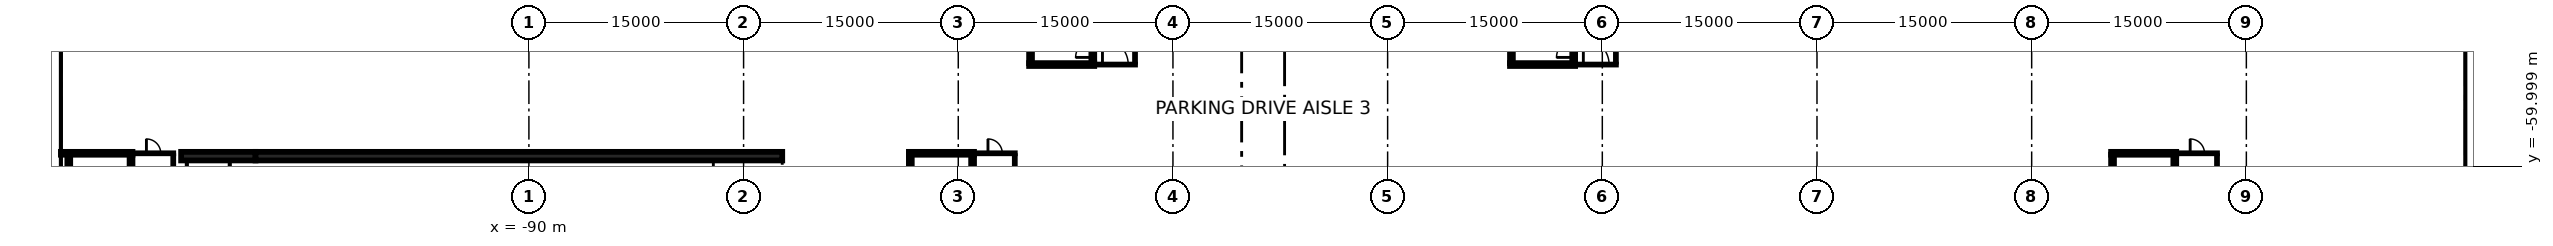
"""IFC4 building model, lengths in metres.
Left out: names, types, materials, properties, quantities, classifications, styles, units other than length and angle.
Written with IfcOpenShell. Run it as: python <this file> out.ifc"""

import sys

from ifc_helpers import new_model, si_unit, direction, frame, frame_2d, origin, place, context, subcontext, project, spatial, rectangle, extrude, element, fill, save


model = new_model("IFC4")
c1 = context("Model", 3, precision=1e-05, world=origin(), true_north=direction((0.0, 1.0)))
c2 = subcontext(c1, "Body", "Model", "MODEL_VIEW")
j1 = project(units=[si_unit("LENGTHUNIT", "METRE"), si_unit("PLANEANGLEUNIT", "RADIAN")], contexts=[c1])
p1 = place(None, origin())
s1 = spatial("IfcSite", under=j1, at=p1, CompositionType="ELEMENT")
p2 = place(p1, origin())
s2 = spatial("IfcBuilding", under=s1, at=p2, CompositionType="ELEMENT")
p3 = place(p2, frame((0.0, 0.0, -12.0)))
s3 = spatial("IfcBuildingStorey", under=s2, at=p3, CompositionType="ELEMENT", Elevation=-12.0)
for number, where, z_axis, x_axis in (
    (1, (-123.15, -80.0, 0.0), (0.0, 0.0, 1.0), (0.0, 1.0, 0.0)),
    (2, (45.75, -80.0, 0.0), (0.0, 0.0, 1.0), (0.0, 1.0, 0.0)),
):
    element("IfcWall", number, at=place(p3, frame(where, z_axis=z_axis, x_axis=x_axis)), inside=s3, PredefinedType="USERDEFINED", context=c2, shape_type="SweptSolid", body=[
        extrude(rectangle(XDim=160.0, YDim=0.9, at=frame_2d((80.0, 0.0))), origin(), (0.0, 0.0, 1.0), 11.55),
    ])
p4 = place(p2, frame((0.0, 0.0, -3.6)))
s4 = spatial("IfcBuildingStorey", under=s2, at=p4, CompositionType="ELEMENT", Elevation=-3.6)
p5 = place(p4, frame((-58.9, -59.1, 0.0), z_axis=(0.0, 0.0, 1.0), x_axis=(1.0, 0.0, 0.0)))
e3 = element("IfcWall", 3, at=p5, inside=s4, PredefinedType="PARTITIONING", context=c2, shape_type="SweptSolid", body=[
    extrude(rectangle(XDim=2.95, YDim=0.2, at=frame_2d((1.475, 0.0))), origin(), (0.0, 0.0, 1.0), 3.15),
])
p6 = place(p5, frame((0.975, 0.0, 0.0)))
e4 = element("IfcOpeningElement", 4, at=p6, cuts=e3, PredefinedType="OPENING", context=c2, shape_type="SweptSolid", body=[
    extrude(rectangle(XDim=1.0, YDim=2.1, at=frame_2d((0.5, 1.05))), frame((0.0, 0.11, 0.0), z_axis=(0.0, -1.0, 0.0), x_axis=(1.0, 0.0, 0.0)), (0.0, 0.0, 1.0), 0.22),
])
p7 = place(p4, frame((-56.05, -64.8, 0.0), z_axis=(0.0, 0.0, 1.0), x_axis=(0.0, 1.0, 0.0)))
e5 = element("IfcWall", 5, at=p7, inside=s4, PredefinedType="PARTITIONING", context=c2, shape_type="SweptSolid", body=[
    extrude(rectangle(XDim=5.6, YDim=0.2, at=frame_2d((2.8, 0.0))), origin(), (0.0, 0.0, 1.0), 3.15),
])
p8 = place(p4, frame((-50.5, -52.9, 0.0), z_axis=(0.0, 0.0, 1.0), x_axis=(1.0, 0.0, 0.0)))
e6 = element("IfcWall", 6, at=p8, inside=s4, PredefinedType="PARTITIONING", context=c2, shape_type="SweptSolid", body=[
    extrude(rectangle(XDim=2.95, YDim=0.2, at=frame_2d((1.475, 0.0))), origin(), (0.0, 0.0, 1.0), 3.15),
])
p9 = place(p8, frame((0.575, 0.0, 0.0)))
e7 = element("IfcOpeningElement", 7, at=p9, cuts=e6, PredefinedType="OPENING", context=c2, shape_type="SweptSolid", body=[
    extrude(rectangle(XDim=1.8, YDim=2.1, at=frame_2d((0.9, 1.05))), frame((0.0, 0.11, 0.0), z_axis=(0.0, -1.0, 0.0), x_axis=(1.0, 0.0, 0.0)), (0.0, 0.0, 1.0), 0.22),
])
p10 = place(p4, frame((-47.65, -52.8, 0.0), z_axis=(0.0, 0.0, 1.0), x_axis=(0.0, 1.0, 0.0)))
e8 = element("IfcWall", 8, at=p10, inside=s4, PredefinedType="PARTITIONING", context=c2, shape_type="SweptSolid", body=[
    extrude(rectangle(XDim=3.6, YDim=0.2, at=frame_2d((1.8, 0.0))), origin(), (0.0, 0.0, 1.0), 3.15),
])
p11 = place(p4, frame((-16.9, -52.9, 0.0), z_axis=(0.0, 0.0, 1.0), x_axis=(1.0, 0.0, 0.0)))
e9 = element("IfcWall", 9, at=p11, inside=s4, PredefinedType="PARTITIONING", context=c2, shape_type="SweptSolid", body=[
    extrude(rectangle(XDim=2.95, YDim=0.2, at=frame_2d((1.475, 0.0))), origin(), (0.0, 0.0, 1.0), 3.15),
])
p12 = place(p11, frame((0.575, 0.0, 0.0)))
e10 = element("IfcOpeningElement", 10, at=p12, cuts=e9, PredefinedType="OPENING", context=c2, shape_type="SweptSolid", body=[
    extrude(rectangle(XDim=1.8, YDim=2.1, at=frame_2d((0.9, 1.05))), frame((0.0, 0.11, 0.0), z_axis=(0.0, -1.0, 0.0), x_axis=(1.0, 0.0, 0.0)), (0.0, 0.0, 1.0), 0.22),
])
p13 = place(p4, frame((-14.05, -52.8, 0.0), z_axis=(0.0, 0.0, 1.0), x_axis=(0.0, 1.0, 0.0)))
e11 = element("IfcWall", 11, at=p13, inside=s4, PredefinedType="PARTITIONING", context=c2, shape_type="SweptSolid", body=[
    extrude(rectangle(XDim=3.6, YDim=0.2, at=frame_2d((1.8, 0.0))), origin(), (0.0, 0.0, 1.0), 3.15),
])
p14 = place(p4, frame((25.1, -59.1, 0.0), z_axis=(0.0, 0.0, 1.0), x_axis=(1.0, 0.0, 0.0)))
e12 = element("IfcWall", 12, at=p14, inside=s4, PredefinedType="PARTITIONING", context=c2, shape_type="SweptSolid", body=[
    extrude(rectangle(XDim=2.95, YDim=0.2, at=frame_2d((1.475, 0.0))), origin(), (0.0, 0.0, 1.0), 3.15),
])
p15 = place(p14, frame((0.975, 0.0, 0.0)))
e13 = element("IfcOpeningElement", 13, at=p15, cuts=e12, PredefinedType="OPENING", context=c2, shape_type="SweptSolid", body=[
    extrude(rectangle(XDim=1.0, YDim=2.1, at=frame_2d((0.5, 1.05))), frame((0.0, 0.11, 0.0), z_axis=(0.0, -1.0, 0.0), x_axis=(1.0, 0.0, 0.0)), (0.0, 0.0, 1.0), 0.22),
])
p16 = place(p4, frame((27.95, -64.8, 0.0), z_axis=(0.0, 0.0, 1.0), x_axis=(0.0, 1.0, 0.0)))
e14 = element("IfcWall", 14, at=p16, inside=s4, PredefinedType="PARTITIONING", context=c2, shape_type="SweptSolid", body=[
    extrude(rectangle(XDim=5.6, YDim=0.2, at=frame_2d((2.8, 0.0))), origin(), (0.0, 0.0, 1.0), 3.15),
])
p17 = place(p4, frame((-117.7, -59.1, 0.0), z_axis=(0.0, 0.0, 1.0), x_axis=(1.0, 0.0, 0.0)))
e15 = element("IfcWall", 15, at=p17, inside=s4, PredefinedType="PARTITIONING", context=c2, shape_type="SweptSolid", body=[
    extrude(rectangle(XDim=2.95, YDim=0.2, at=frame_2d((1.475, 0.0))), origin(), (0.0, 0.0, 1.0), 3.15),
])
p18 = place(p17, frame((0.975, 0.0, 0.0)))
e16 = element("IfcOpeningElement", 16, at=p18, cuts=e15, PredefinedType="OPENING", context=c2, shape_type="SweptSolid", body=[
    extrude(rectangle(XDim=1.0, YDim=2.1, at=frame_2d((0.5, 1.05))), frame((0.0, 0.11, 0.0), z_axis=(0.0, -1.0, 0.0), x_axis=(1.0, 0.0, 0.0)), (0.0, 0.0, 1.0), 0.22),
])
p19 = place(p4, frame((-114.85, -64.8, 0.0), z_axis=(0.0, 0.0, 1.0), x_axis=(0.0, 1.0, 0.0)))
e17 = element("IfcWall", 17, at=p19, inside=s4, PredefinedType="PARTITIONING", context=c2, shape_type="SweptSolid", body=[
    extrude(rectangle(XDim=5.6, YDim=0.2, at=frame_2d((2.8, 0.0))), origin(), (0.0, 0.0, 1.0), 3.15),
])
p20 = place(p4, frame((-63.35, -68.8, 0.0), z_axis=(0.0, 0.0, 1.0), x_axis=(0.0, 1.0, 0.0)))
e18 = element("IfcWall", 18, at=p20, inside=s4, PredefinedType="SOLIDWALL", context=c2, shape_type="SweptSolid", body=[
    extrude(rectangle(XDim=9.6, YDim=0.2, at=frame_2d((4.8, 0.0))), origin(), (0.0, 0.0, 1.0), 3.15),
])
p21 = place(p4, frame((-59.0, -68.8, 0.0), z_axis=(0.0, 0.0, 1.0), x_axis=(0.0, 1.0, 0.0)))
e19 = element("IfcWall", 19, at=p21, inside=s4, PredefinedType="SOLIDWALL", context=c2, shape_type="SweptSolid", body=[
    extrude(rectangle(XDim=9.6, YDim=0.2, at=frame_2d((4.8, 0.0))), origin(), (0.0, 0.0, 1.0), 3.15),
])
p22 = place(p21, frame((0.4, 0.0, 0.0)))
e20 = element("IfcOpeningElement", 20, at=p22, cuts=e19, PredefinedType="OPENING", context=c2, shape_type="SweptSolid", body=[
    extrude(rectangle(XDim=1.2, YDim=2.1, at=frame_2d((0.6, 1.05))), frame((0.0, 0.11, 0.0), z_axis=(0.0, -1.0, 0.0), x_axis=(1.0, 0.0, 0.0)), (0.0, 0.0, 1.0), 0.22),
])
p23 = place(p4, frame((-63.45, -59.1, 0.0), z_axis=(0.0, 0.0, 1.0), x_axis=(1.0, 0.0, 0.0)))
e21 = element("IfcWall", 21, at=p23, inside=s4, PredefinedType="SOLIDWALL", context=c2, shape_type="SweptSolid", body=[
    extrude(rectangle(XDim=4.55, YDim=0.2, at=frame_2d((2.275, 0.0))), origin(), (0.0, 0.0, 1.0), 3.15),
])
p24 = place(p4, frame((-54.95, -52.8, 0.0), z_axis=(0.0, 0.0, 1.0), x_axis=(0.0, 1.0, 0.0)))
e22 = element("IfcWall", 22, at=p24, inside=s4, PredefinedType="SOLIDWALL", context=c2, shape_type="SweptSolid", body=[
    extrude(rectangle(XDim=9.6, YDim=0.2, at=frame_2d((4.8, 0.0))), origin(), (0.0, 0.0, 1.0), 3.15),
])
p25 = place(p4, frame((-50.6, -52.8, 0.0), z_axis=(0.0, 0.0, 1.0), x_axis=(0.0, 1.0, 0.0)))
e23 = element("IfcWall", 23, at=p25, inside=s4, PredefinedType="SOLIDWALL", context=c2, shape_type="SweptSolid", body=[
    extrude(rectangle(XDim=9.6, YDim=0.2, at=frame_2d((4.8, 0.0))), origin(), (0.0, 0.0, 1.0), 3.15),
])
p26 = place(p25, frame((0.4, 0.0, 0.0)))
e24 = element("IfcOpeningElement", 24, at=p26, cuts=e23, PredefinedType="OPENING", context=c2, shape_type="SweptSolid", body=[
    extrude(rectangle(XDim=1.2, YDim=2.1, at=frame_2d((0.6, 1.05))), frame((0.0, 0.11, 0.0), z_axis=(0.0, -1.0, 0.0), x_axis=(1.0, 0.0, 0.0)), (0.0, 0.0, 1.0), 0.22),
])
p27 = place(p4, frame((-50.5, -52.9, 0.0), z_axis=(0.0, 0.0, 1.0), x_axis=(-1.0, 0.0, 0.0)))
e25 = element("IfcWall", 25, at=p27, inside=s4, PredefinedType="SOLIDWALL", context=c2, shape_type="SweptSolid", body=[
    extrude(rectangle(XDim=4.55, YDim=0.2, at=frame_2d((2.275, 0.0))), origin(), (0.0, 0.0, 1.0), 3.15),
])
p28 = place(p4, frame((-21.35, -52.8, 0.0), z_axis=(0.0, 0.0, 1.0), x_axis=(0.0, 1.0, 0.0)))
e26 = element("IfcWall", 26, at=p28, inside=s4, PredefinedType="SOLIDWALL", context=c2, shape_type="SweptSolid", body=[
    extrude(rectangle(XDim=9.6, YDim=0.2, at=frame_2d((4.8, 0.0))), origin(), (0.0, 0.0, 1.0), 3.15),
])
p29 = place(p4, frame((-17.0, -52.8, 0.0), z_axis=(0.0, 0.0, 1.0), x_axis=(0.0, 1.0, 0.0)))
e27 = element("IfcWall", 27, at=p29, inside=s4, PredefinedType="SOLIDWALL", context=c2, shape_type="SweptSolid", body=[
    extrude(rectangle(XDim=9.6, YDim=0.2, at=frame_2d((4.8, 0.0))), origin(), (0.0, 0.0, 1.0), 3.15),
])
p30 = place(p29, frame((0.4, 0.0, 0.0)))
e28 = element("IfcOpeningElement", 28, at=p30, cuts=e27, PredefinedType="OPENING", context=c2, shape_type="SweptSolid", body=[
    extrude(rectangle(XDim=1.2, YDim=2.1, at=frame_2d((0.6, 1.05))), frame((0.0, 0.11, 0.0), z_axis=(0.0, -1.0, 0.0), x_axis=(1.0, 0.0, 0.0)), (0.0, 0.0, 1.0), 0.22),
])
p31 = place(p4, frame((-16.9, -52.9, 0.0), z_axis=(0.0, 0.0, 1.0), x_axis=(-1.0, 0.0, 0.0)))
e29 = element("IfcWall", 29, at=p31, inside=s4, PredefinedType="SOLIDWALL", context=c2, shape_type="SweptSolid", body=[
    extrude(rectangle(XDim=4.55, YDim=0.2, at=frame_2d((2.275, 0.0))), origin(), (0.0, 0.0, 1.0), 3.15),
])
p32 = place(p4, frame((20.65, -68.8, 0.0), z_axis=(0.0, 0.0, 1.0), x_axis=(0.0, 1.0, 0.0)))
e30 = element("IfcWall", 30, at=p32, inside=s4, PredefinedType="SOLIDWALL", context=c2, shape_type="SweptSolid", body=[
    extrude(rectangle(XDim=9.6, YDim=0.2, at=frame_2d((4.8, 0.0))), origin(), (0.0, 0.0, 1.0), 3.15),
])
p33 = place(p4, frame((25.0, -68.8, 0.0), z_axis=(0.0, 0.0, 1.0), x_axis=(0.0, 1.0, 0.0)))
e31 = element("IfcWall", 31, at=p33, inside=s4, PredefinedType="SOLIDWALL", context=c2, shape_type="SweptSolid", body=[
    extrude(rectangle(XDim=9.6, YDim=0.2, at=frame_2d((4.8, 0.0))), origin(), (0.0, 0.0, 1.0), 3.15),
])
p34 = place(p33, frame((0.4, 0.0, 0.0)))
e32 = element("IfcOpeningElement", 32, at=p34, cuts=e31, PredefinedType="OPENING", context=c2, shape_type="SweptSolid", body=[
    extrude(rectangle(XDim=1.2, YDim=2.1, at=frame_2d((0.6, 1.05))), frame((0.0, 0.11, 0.0), z_axis=(0.0, -1.0, 0.0), x_axis=(1.0, 0.0, 0.0)), (0.0, 0.0, 1.0), 0.22),
])
p35 = place(p4, frame((20.55, -59.1, 0.0), z_axis=(0.0, 0.0, 1.0), x_axis=(1.0, 0.0, 0.0)))
e33 = element("IfcWall", 33, at=p35, inside=s4, PredefinedType="SOLIDWALL", context=c2, shape_type="SweptSolid", body=[
    extrude(rectangle(XDim=4.55, YDim=0.2, at=frame_2d((2.275, 0.0))), origin(), (0.0, 0.0, 1.0), 3.15),
])
p36 = place(p4, frame((-122.15, -68.8, 0.0), z_axis=(0.0, 0.0, 1.0), x_axis=(0.0, 1.0, 0.0)))
e34 = element("IfcWall", 34, at=p36, inside=s4, PredefinedType="SOLIDWALL", context=c2, shape_type="SweptSolid", body=[
    extrude(rectangle(XDim=9.6, YDim=0.2, at=frame_2d((4.8, 0.0))), origin(), (0.0, 0.0, 1.0), 3.15),
])
p37 = place(p4, frame((-117.8, -68.8, 0.0), z_axis=(0.0, 0.0, 1.0), x_axis=(0.0, 1.0, 0.0)))
e35 = element("IfcWall", 35, at=p37, inside=s4, PredefinedType="SOLIDWALL", context=c2, shape_type="SweptSolid", body=[
    extrude(rectangle(XDim=9.6, YDim=0.2, at=frame_2d((4.8, 0.0))), origin(), (0.0, 0.0, 1.0), 3.15),
])
p38 = place(p37, frame((0.4, 0.0, 0.0)))
e36 = element("IfcOpeningElement", 36, at=p38, cuts=e35, PredefinedType="OPENING", context=c2, shape_type="SweptSolid", body=[
    extrude(rectangle(XDim=1.2, YDim=2.1, at=frame_2d((0.6, 1.05))), frame((0.0, 0.11, 0.0), z_axis=(0.0, -1.0, 0.0), x_axis=(1.0, 0.0, 0.0)), (0.0, 0.0, 1.0), 0.22),
])
p39 = place(p4, frame((-122.7, -59.1, 0.0), z_axis=(0.0, 0.0, 1.0), x_axis=(1.0, 0.0, 0.0)))
e37 = element("IfcWall", 37, at=p39, inside=s4, PredefinedType="SOLIDWALL", context=c2, shape_type="SweptSolid", body=[
    extrude(rectangle(XDim=5.0, YDim=0.2, at=frame_2d((2.5, 0.0))), origin(), (0.0, 0.0, 1.0), 3.15),
])
p40 = place(p4, frame((-114.3, -59.3, 0.0), z_axis=(0.0, 0.0, 1.0), x_axis=(1.0, 0.0, 0.0)))
e38 = element("IfcWall", 38, at=p40, inside=s4, PredefinedType="SOLIDWALL", context=c2, shape_type="SweptSolid", body=[
    extrude(rectangle(XDim=5.2, YDim=0.6, at=frame_2d((2.6, 0.0))), origin(), (0.0, 0.0, 1.0), 3.15),
])
p41 = place(p4, frame((-109.1, -59.3, 0.0), z_axis=(0.0, 0.0, 1.0), x_axis=(1.0, 0.0, 0.0)))
e39 = element("IfcWall", 39, at=p41, inside=s4, PredefinedType="SOLIDWALL", context=c2, shape_type="SweptSolid", body=[
    extrude(rectangle(XDim=36.8, YDim=0.6, at=frame_2d((18.4, 0.0))), origin(), (0.0, 0.0, 1.0), 3.15),
])
p42 = place(p6, origin())
e40 = element("IfcDoor", 40, at=p42, inside=s4, OperationType="SINGLE_SWING_LEFT", PredefinedType="DOOR", context=c2, shape_type="SweptSolid", body=[
    extrude(rectangle(XDim=1.0, YDim=2.1, at=frame_2d((0.5, 1.05))), frame((0.0, 0.025, 0.0), z_axis=(0.0, -1.0, 0.0), x_axis=(1.0, 0.0, 0.0)), (0.0, 0.0, 1.0), 0.05),
])
fill(e4, e40)
p43 = place(p9, origin())
e41 = element("IfcDoor", 41, at=p43, inside=s4, OperationType="DOUBLE_DOOR_SINGLE_SWING", PredefinedType="DOOR", context=c2, shape_type="SweptSolid", body=[
    extrude(rectangle(XDim=1.8, YDim=2.1, at=frame_2d((0.9, 1.05))), frame((0.0, 0.025, 0.0), z_axis=(0.0, -1.0, 0.0), x_axis=(1.0, 0.0, 0.0)), (0.0, 0.0, 1.0), 0.05),
])
fill(e7, e41)
p44 = place(p12, origin())
e42 = element("IfcDoor", 42, at=p44, inside=s4, OperationType="DOUBLE_DOOR_SINGLE_SWING", PredefinedType="DOOR", context=c2, shape_type="SweptSolid", body=[
    extrude(rectangle(XDim=1.8, YDim=2.1, at=frame_2d((0.9, 1.05))), frame((0.0, 0.025, 0.0), z_axis=(0.0, -1.0, 0.0), x_axis=(1.0, 0.0, 0.0)), (0.0, 0.0, 1.0), 0.05),
])
fill(e10, e42)
p45 = place(p15, origin())
e43 = element("IfcDoor", 43, at=p45, inside=s4, OperationType="SINGLE_SWING_LEFT", PredefinedType="DOOR", context=c2, shape_type="SweptSolid", body=[
    extrude(rectangle(XDim=1.0, YDim=2.1, at=frame_2d((0.5, 1.05))), frame((0.0, 0.025, 0.0), z_axis=(0.0, -1.0, 0.0), x_axis=(1.0, 0.0, 0.0)), (0.0, 0.0, 1.0), 0.05),
])
fill(e13, e43)
p46 = place(p18, origin())
e44 = element("IfcDoor", 44, at=p46, inside=s4, OperationType="SINGLE_SWING_LEFT", PredefinedType="DOOR", context=c2, shape_type="SweptSolid", body=[
    extrude(rectangle(XDim=1.0, YDim=2.1, at=frame_2d((0.5, 1.05))), frame((0.0, 0.025, 0.0), z_axis=(0.0, -1.0, 0.0), x_axis=(1.0, 0.0, 0.0)), (0.0, 0.0, 1.0), 0.05),
])
fill(e16, e44)
p47 = place(p26, origin())
e45 = element("IfcDoor", 45, at=p47, inside=s4, OperationType="SINGLE_SWING_LEFT", PredefinedType="DOOR", context=c2, shape_type="SweptSolid", body=[
    extrude(rectangle(XDim=1.2, YDim=2.1, at=frame_2d((0.6, 1.05))), frame((0.0, 0.025, 0.0), z_axis=(0.0, -1.0, 0.0), x_axis=(1.0, 0.0, 0.0)), (0.0, 0.0, 1.0), 0.05),
])
fill(e24, e45)
p48 = place(p30, origin())
e46 = element("IfcDoor", 46, at=p48, inside=s4, OperationType="SINGLE_SWING_LEFT", PredefinedType="DOOR", context=c2, shape_type="SweptSolid", body=[
    extrude(rectangle(XDim=1.2, YDim=2.1, at=frame_2d((0.6, 1.05))), frame((0.0, 0.025, 0.0), z_axis=(0.0, -1.0, 0.0), x_axis=(1.0, 0.0, 0.0)), (0.0, 0.0, 1.0), 0.05),
])
fill(e28, e46)
save(model, sys.argv[1])
